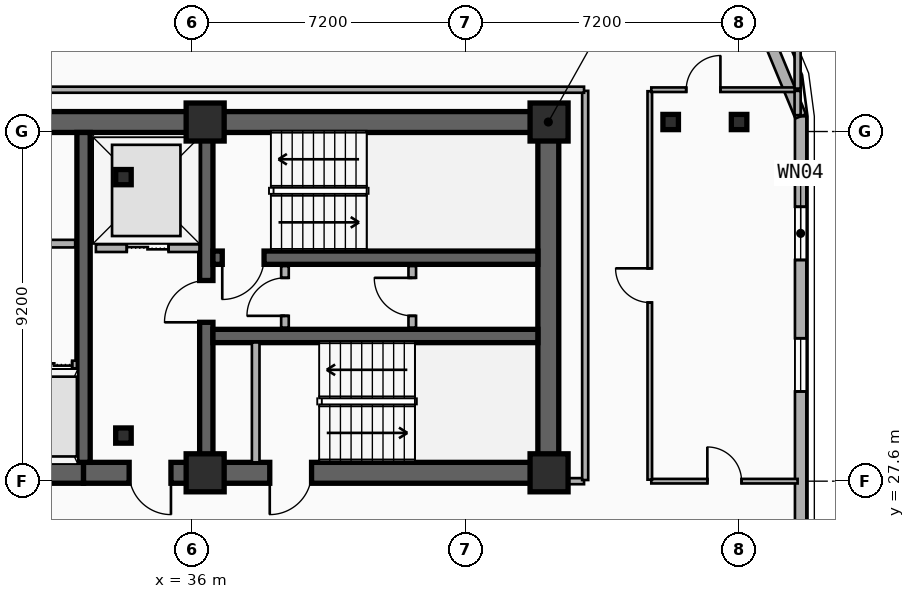
"""IFC4 building model, lengths in metres.
Left out: names, types, materials, properties, quantities, classifications, styles, units other than length and angle.
Written with IfcOpenShell. Run it as: python <this file> out.ifc"""

import sys

from ifc_helpers import new_model, si_unit, direction, frame, frame_2d, origin, origin_2d, place, context, subcontext, project, spatial, rectangle, i_section, extrude, element, fill, save


model = new_model("IFC4")
c1 = context("Model", 3, precision=1e-05, world=origin(), true_north=direction((0.0, 1.0)))
c2 = subcontext(c1, "Body", "Model", "MODEL_VIEW")
j1 = project(units=[si_unit("LENGTHUNIT", "METRE"), si_unit("PLANEANGLEUNIT", "RADIAN")], contexts=[c1])
p1 = place(None, origin())
s1 = spatial("IfcSite", under=j1, at=p1, CompositionType="ELEMENT")
p2 = place(p1, origin())
s2 = spatial("IfcBuilding", under=s1, at=p2, CompositionType="ELEMENT")
p3 = place(p2, frame((0.0, 0.0, 196.8)))
s3 = spatial("IfcBuildingStorey", under=s2, at=p3, CompositionType="ELEMENT", Elevation=196.8)
p4 = place(p3, frame((12.15, 37.05, 0.0), z_axis=(0.0, 0.0, 1.0), x_axis=(1.0, 0.0, 0.0)))
e1 = element("IfcWall", 1, at=p4, inside=s3, PredefinedType="SHEAR", context=c2, shape_type="SweptSolid", body=[
    extrude(rectangle(XDim=33.23, YDim=0.55, at=frame_2d((16.615, 0.0))), origin(), (0.0, 0.0, 1.0), 3.6),
])
p5 = place(p3, frame((33.15, 27.82, 0.0), z_axis=(0.0, 0.0, 1.0), x_axis=(-1.0, 0.0, 0.0)))
e2 = element("IfcWall", 2, at=p5, inside=s3, PredefinedType="SHEAR", context=c2, shape_type="SweptSolid", body=[
    extrude(rectangle(XDim=11.97, YDim=0.55, at=frame_2d((5.985, 0.0))), origin(), (0.0, 0.0, 1.0), 3.6),
])
p6 = place(p5, frame((6.1, 0.0, 0.0)))
e3 = element("IfcOpeningElement", 3, at=p6, cuts=e2, PredefinedType="OPENING", context=c2, shape_type="SweptSolid", body=[
    extrude(rectangle(XDim=1.6, YDim=2.2, at=frame_2d((0.8, 1.1))), frame((0.0, 0.285, 0.0), z_axis=(0.0, -1.0, 0.0), x_axis=(1.0, 0.0, 0.0)), (0.0, 0.0, 1.0), 0.57),
])
p7 = place(p3, frame((45.38, 27.82, 0.0), z_axis=(0.0, 0.0, 1.0), x_axis=(-1.0, 0.0, 0.0)))
e4 = element("IfcWall", 4, at=p7, inside=s3, PredefinedType="SHEAR", context=c2, shape_type="SweptSolid", body=[
    extrude(rectangle(XDim=12.23, YDim=0.55, at=frame_2d((6.115, 0.0))), origin(), (0.0, 0.0, 1.0), 3.6),
])
p8 = place(p7, frame((9.93, 0.0, 0.0)))
e5 = element("IfcOpeningElement", 5, at=p8, cuts=e4, PredefinedType="OPENING", context=c2, shape_type="SweptSolid", body=[
    extrude(rectangle(XDim=1.1, YDim=2.15, at=frame_2d((0.55, 1.075))), frame((0.0, 0.285, 0.0), z_axis=(0.0, -1.0, 0.0), x_axis=(1.0, 0.0, 0.0)), (0.0, 0.0, 1.0), 0.57),
])
p9 = place(p7, frame((6.23, 0.0, 0.0)))
e6 = element("IfcOpeningElement", 6, at=p9, cuts=e4, PredefinedType="OPENING", context=c2, shape_type="SweptSolid", body=[
    extrude(rectangle(XDim=1.1, YDim=2.15, at=frame_2d((0.55, 1.075))), frame((0.0, 0.285, 0.0), z_axis=(0.0, -1.0, 0.0), x_axis=(1.0, 0.0, 0.0)), (0.0, 0.0, 1.0), 0.57),
])
p10 = place(p3, frame((45.38, 28.095, 0.0), z_axis=(0.0, 0.0, 1.0), x_axis=(0.0, 1.0, 0.0)))
e7 = element("IfcWall", 7, at=p10, inside=s3, PredefinedType="SHEAR", context=c2, shape_type="SweptSolid", body=[
    extrude(rectangle(XDim=8.68, YDim=0.55, at=frame_2d((4.34, 0.0))), origin(), (0.0, 0.0, 1.0), 3.6),
])
p11 = place(p3, frame((33.15, 28.095, 0.0), z_axis=(0.0, 0.0, 1.0), x_axis=(0.0, 1.0, 0.0)))
e8 = element("IfcWall", 8, at=p11, inside=s3, PredefinedType="SHEAR", context=c2, shape_type="SweptSolid", body=[
    extrude(rectangle(XDim=8.68, YDim=0.35, at=frame_2d((4.34, 0.0))), origin(), (0.0, 0.0, 1.0), 3.6),
])
p12 = place(p3, frame((36.38, 28.095, 0.0), z_axis=(0.0, 0.0, 1.0), x_axis=(0.0, 1.0, 0.0)))
e9 = element("IfcWall", 9, at=p12, inside=s3, PredefinedType="SHEAR", context=c2, shape_type="SweptSolid", body=[
    extrude(rectangle(XDim=8.68, YDim=0.35, at=frame_2d((4.34, 0.0))), origin(), (0.0, 0.0, 1.0), 3.6),
])
p13 = place(p12, frame((3.685, 0.0, 0.0)))
e10 = element("IfcOpeningElement", 10, at=p13, cuts=e9, PredefinedType="OPENING", context=c2, shape_type="SweptSolid", body=[
    extrude(rectangle(XDim=1.1, YDim=2.15, at=frame_2d((0.55, 1.075))), frame((0.0, 0.185, 0.0), z_axis=(0.0, -1.0, 0.0), x_axis=(1.0, 0.0, 0.0)), (0.0, 0.0, 1.0), 0.37),
])
p14 = place(p3, frame((45.105, 33.48, 0.0), z_axis=(0.0, 0.0, 1.0), x_axis=(-1.0, 0.0, 0.0)))
e11 = element("IfcWall", 11, at=p14, inside=s3, PredefinedType="SHEAR", context=c2, shape_type="SweptSolid", body=[
    extrude(rectangle(XDim=8.55, YDim=0.35, at=frame_2d((4.275, 0.0))), origin(), (0.0, 0.0, 1.0), 3.6),
])
p15 = place(p14, frame((7.205, 0.0, 0.0)))
e12 = element("IfcOpeningElement", 12, at=p15, cuts=e11, PredefinedType="OPENING", context=c2, shape_type="SweptSolid", body=[
    extrude(rectangle(XDim=1.1, YDim=2.15, at=frame_2d((0.55, 1.075))), frame((0.0, 0.185, 0.0), z_axis=(0.0, -1.0, 0.0), x_axis=(1.0, 0.0, 0.0)), (0.0, 0.0, 1.0), 0.37),
])
p16 = place(p3, frame((36.555, 31.42, 0.0), z_axis=(0.0, 0.0, 1.0), x_axis=(1.0, 0.0, 0.0)))
e13 = element("IfcWall", 13, at=p16, inside=s3, PredefinedType="SHEAR", context=c2, shape_type="SweptSolid", body=[
    extrude(rectangle(XDim=8.55, YDim=0.35, at=frame_2d((4.275, 0.0))), origin(), (0.0, 0.0, 1.0), 3.6),
])
for number, where, z_axis, x_axis in (
    (14, (34.2, 28.8, 0.0), (0.0, 0.0, 1.0), (1.0, 0.0, 0.0)),
    (15, (34.2, 35.6, 0.0), (0.0, 0.0, 1.0), (1.0, 0.0, 0.0)),
):
    element("IfcColumn", number, at=place(p3, frame(where, z_axis=z_axis, x_axis=x_axis)), inside=s3, PredefinedType="COLUMN", context=c2, shape_type="SweptSolid", body=[
        extrude(i_section(OverallWidth=0.408, OverallDepth=0.4, WebThickness=0.025, FlangeThickness=0.039, FilletRadius=0.015, at=origin_2d()), origin(), (0.0, 0.0, 1.0), 3.6),
    ])
for number, where, z_axis, x_axis in (
    (16, (36.35, 27.82, 0.0), (0.0, 0.0, 1.0), (1.0, 0.0, 0.0)),
    (17, (36.35, 37.05, 0.0), (0.0, 0.0, 1.0), (1.0, 0.0, 0.0)),
    (18, (45.4, 27.82, 0.0), (0.0, 0.0, 1.0), (1.0, 0.0, 0.0)),
    (19, (45.4, 37.05, 0.0), (0.0, 0.0, 1.0), (1.0, 0.0, 0.0)),
):
    element("IfcColumn", number, at=place(p3, frame(where, z_axis=z_axis, x_axis=x_axis)), inside=s3, PredefinedType="COLUMN", context=c2, shape_type="SweptSolid", body=[
        extrude(rectangle(XDim=1.0, YDim=1.0, at=origin_2d()), origin(), (0.0, 0.0, 1.0), 3.6),
    ])
for number, where, z_axis, x_axis in (
    (20, (48.6, 37.05, 0.0), (0.0, 0.0, 1.0), (1.0, 0.0, 0.0)),
    (21, (50.4, 37.05, 0.0), (0.0, 0.0, 1.0), (1.0, 0.0, 0.0)),
):
    element("IfcColumn", number, at=place(p3, frame(where, z_axis=z_axis, x_axis=x_axis)), inside=s3, PredefinedType="COLUMN", context=c2, shape_type="SweptSolid", body=[
        extrude(i_section(OverallWidth=0.408, OverallDepth=0.4, WebThickness=0.025, FlangeThickness=0.039, FilletRadius=0.015, at=origin_2d()), origin(), (0.0, 0.0, 1.0), 3.6),
    ])
p17 = place(p3, frame((52.02, 37.2, 0.0), z_axis=(0.0, 0.0, 1.0), x_axis=(0.0, -1.0, 0.0)))
e22 = element("IfcWall", 22, at=p17, inside=s3, PredefinedType="SOLIDWALL", context=c2, shape_type="SweptSolid", body=[
    extrude(rectangle(XDim=28.6, YDim=0.3, at=frame_2d((14.3, 0.0))), origin(), (0.0, 0.0, 1.0), 3.34),
])
p18 = place(p17, frame((2.38, 0.0, 0.34)))
e23 = element("IfcOpeningElement", 23, at=p18, cuts=e22, PredefinedType="OPENING", context=c2, shape_type="SweptSolid", body=[
    extrude(rectangle(XDim=1.4, YDim=2.1, at=frame_2d((0.7, 1.05))), frame((0.0, 0.16, 0.0), z_axis=(0.0, -1.0, 0.0), x_axis=(1.0, 0.0, 0.0)), (0.0, 0.0, 1.0), 0.32),
])
p19 = place(p17, frame((5.84, 0.0, 0.34)))
e24 = element("IfcOpeningElement", 24, at=p19, cuts=e22, PredefinedType="OPENING", context=c2, shape_type="SweptSolid", body=[
    extrude(rectangle(XDim=1.4, YDim=2.1, at=frame_2d((0.7, 1.05))), frame((0.0, 0.16, 0.0), z_axis=(0.0, -1.0, 0.0), x_axis=(1.0, 0.0, 0.0)), (0.0, 0.0, 1.0), 0.32),
])
p20 = place(p17, frame((16.527, 0.0, 0.34)))
e25 = element("IfcOpeningElement", 25, at=p20, cuts=e22, PredefinedType="OPENING", context=c2, shape_type="SweptSolid", body=[
    extrude(rectangle(XDim=1.4, YDim=2.1, at=frame_2d((0.7, 1.05))), frame((0.0, 0.16, 0.0), z_axis=(0.0, -1.0, 0.0), x_axis=(1.0, 0.0, 0.0)), (0.0, 0.0, 1.0), 0.32),
])
p21 = place(p17, frame((22.403, 0.0, 0.34)))
e26 = element("IfcOpeningElement", 26, at=p21, cuts=e22, PredefinedType="OPENING", context=c2, shape_type="SweptSolid", body=[
    extrude(rectangle(XDim=1.4, YDim=2.1, at=frame_2d((0.7, 1.05))), frame((0.0, 0.16, 0.0), z_axis=(0.0, -1.0, 0.0), x_axis=(1.0, 0.0, 0.0)), (0.0, 0.0, 1.0), 0.32),
])
p22 = place(p3, frame((50.843, 40.042, 0.0), z_axis=(0.0, 0.0, 1.0), x_axis=(0.382704529509, -0.923870793506, 0.0)))
e27 = element("IfcWall", 27, at=p22, inside=s3, PredefinedType="SOLIDWALL", context=c2, shape_type="SweptSolid", body=[
    extrude(rectangle(XDim=3.077, YDim=0.3, at=frame_2d((1.538, 0.0))), origin(), (0.0, 0.0, 1.0), 3.34),
])
p23 = place(p3, frame((33.475, 33.73, 0.0), z_axis=(0.0, 0.0, 1.0), x_axis=(1.0, 0.0, 0.0)))
e28 = element("IfcWall", 28, at=p23, inside=s3, PredefinedType="PARTITIONING", context=c2, shape_type="SweptSolid", body=[
    extrude(rectangle(XDim=2.725, YDim=0.2, at=frame_2d((1.362, 0.0))), origin(), (0.0, 0.0, 1.0), 2.41),
])
p24 = place(p23, frame((0.812, 0.0, 0.0)))
e29 = element("IfcOpeningElement", 29, at=p24, cuts=e28, PredefinedType="OPENING", context=c2, shape_type="SweptSolid", body=[
    extrude(rectangle(XDim=1.1, YDim=2.15, at=frame_2d((0.55, 1.075))), frame((0.0, 0.11, 0.0), z_axis=(0.0, -1.0, 0.0), x_axis=(1.0, 0.0, 0.0)), (0.0, 0.0, 1.0), 0.22),
])
p25 = place(p3, frame((31.775, 30.67, 0.0), z_axis=(0.0, 0.0, 1.0), x_axis=(1.0, 0.0, 0.0)))
e30 = element("IfcWall", 30, at=p25, inside=s3, PredefinedType="PARTITIONING", context=c2, shape_type="SweptSolid", body=[
    extrude(rectangle(XDim=1.2, YDim=0.2, at=frame_2d((0.6, 0.0))), origin(), (0.0, 0.0, 1.0), 2.72),
])
p26 = place(p25, frame((0.125, 0.0, 0.0)))
e31 = element("IfcOpeningElement", 31, at=p26, cuts=e30, PredefinedType="OPENING", context=c2, shape_type="SweptSolid", body=[
    extrude(rectangle(XDim=0.95, YDim=2.15, at=frame_2d((0.475, 1.075))), frame((0.0, 0.11, 0.0), z_axis=(0.0, -1.0, 0.0), x_axis=(1.0, 0.0, 0.0)), (0.0, 0.0, 1.0), 0.22),
])
p27 = place(p3, frame((37.68, 28.095, 0.0), z_axis=(0.0, 0.0, 1.0), x_axis=(0.0, 1.0, 0.0)))
e32 = element("IfcWall", 32, at=p27, inside=s3, PredefinedType="PARTITIONING", context=c2, shape_type="SweptSolid", body=[
    extrude(rectangle(XDim=3.155, YDim=0.2, at=frame_2d((1.578, 0.0))), origin(), (0.0, 0.0, 1.0), 2.72),
])
p28 = place(p3, frame((38.45, 31.64, 0.0), z_axis=(0.0, 0.0, 1.0), x_axis=(0.0, 1.0, 0.0)))
e33 = element("IfcWall", 33, at=p28, inside=s3, PredefinedType="PARTITIONING", context=c2, shape_type="SweptSolid", body=[
    extrude(rectangle(XDim=1.62, YDim=0.2, at=frame_2d((0.81, 0.0))), origin(), (0.0, 0.0, 1.0), 3.34),
])
p29 = place(p28, frame((0.31, 0.0, 0.0)))
e34 = element("IfcOpeningElement", 34, at=p29, cuts=e33, PredefinedType="OPENING", context=c2, shape_type="SweptSolid", body=[
    extrude(rectangle(XDim=1.0, YDim=2.15, at=frame_2d((0.5, 1.075))), frame((0.0, 0.11, 0.0), z_axis=(0.0, -1.0, 0.0), x_axis=(1.0, 0.0, 0.0)), (0.0, 0.0, 1.0), 0.22),
])
p30 = place(p3, frame((41.8, 31.64, 0.0), z_axis=(0.0, 0.0, 1.0), x_axis=(0.0, 1.0, 0.0)))
e35 = element("IfcWall", 35, at=p30, inside=s3, PredefinedType="PARTITIONING", context=c2, shape_type="SweptSolid", body=[
    extrude(rectangle(XDim=1.62, YDim=0.2, at=frame_2d((0.81, 0.0))), origin(), (0.0, 0.0, 1.0), 3.34),
])
p31 = place(p30, frame((0.31, 0.0, 0.0)))
e36 = element("IfcOpeningElement", 36, at=p31, cuts=e35, PredefinedType="OPENING", context=c2, shape_type="SweptSolid", body=[
    extrude(rectangle(XDim=1.0, YDim=2.15, at=frame_2d((0.5, 1.075))), frame((0.0, 0.11, 0.0), z_axis=(0.0, -1.0, 0.0), x_axis=(1.0, 0.0, 0.0)), (0.0, 0.0, 1.0), 0.22),
])
p32 = place(p3, frame((27.24, 33.85, 0.0), z_axis=(0.0, 0.0, 1.0), x_axis=(1.0, 0.0, 0.0)))
e37 = element("IfcWall", 37, at=p32, inside=s3, PredefinedType="PARTITIONING", context=c2, shape_type="SweptSolid", body=[
    extrude(rectangle(XDim=5.69, YDim=0.2, at=frame_2d((2.845, 0.0))), origin(), (0.0, 0.0, 1.0), 2.41),
])
p33 = place(p32, frame((2.245, 0.0, 0.0)))
e38 = element("IfcOpeningElement", 38, at=p33, cuts=e37, PredefinedType="OPENING", context=c2, shape_type="SweptSolid", body=[
    extrude(rectangle(XDim=1.2, YDim=2.15, at=frame_2d((0.6, 1.075))), frame((0.0, 0.11, 0.0), z_axis=(0.0, -1.0, 0.0), x_axis=(1.0, 0.0, 0.0)), (0.0, 0.0, 1.0), 0.22),
])
p34 = place(p3, frame((48.09, 27.6, 0.0), z_axis=(0.0, 0.0, 1.0), x_axis=(1.0, 0.0, 0.0)))
e39 = element("IfcWall", 39, at=p34, inside=s3, PredefinedType="PARTITIONING", context=c2, shape_type="SweptSolid", body=[
    extrude(rectangle(XDim=3.85, YDim=0.12, at=frame_2d((1.925, 0.0))), origin(), (0.0, 0.0, 1.0), 2.67),
])
p35 = place(p34, frame((1.475, 0.0, 0.0)))
e40 = element("IfcOpeningElement", 40, at=p35, cuts=e39, PredefinedType="OPENING", context=c2, shape_type="SweptSolid", body=[
    extrude(rectangle(XDim=0.9, YDim=2.1, at=frame_2d((0.45, 1.05))), frame((0.0, 0.07, 0.0), z_axis=(0.0, -1.0, 0.0), x_axis=(1.0, 0.0, 0.0)), (0.0, 0.0, 1.0), 0.14),
])
p36 = place(p3, frame((48.05, 27.64, 0.0), z_axis=(0.0, 0.0, 1.0), x_axis=(0.0, 1.0, 0.0)))
e41 = element("IfcWall", 41, at=p36, inside=s3, PredefinedType="PARTITIONING", context=c2, shape_type="SweptSolid", body=[
    extrude(rectangle(XDim=10.22, YDim=0.12, at=frame_2d((5.11, 0.0))), origin(), (0.0, 0.0, 1.0), 2.82),
])
p37 = place(p36, frame((4.66, 0.0, 0.0)))
e42 = element("IfcOpeningElement", 42, at=p37, cuts=e41, PredefinedType="OPENING", context=c2, shape_type="SweptSolid", body=[
    extrude(rectangle(XDim=0.9, YDim=2.1, at=frame_2d((0.45, 1.05))), frame((0.0, 0.07, 0.0), z_axis=(0.0, -1.0, 0.0), x_axis=(1.0, 0.0, 0.0)), (0.0, 0.0, 1.0), 0.14),
])
p38 = place(p3, frame((48.09, 37.9, 0.0), z_axis=(0.0, 0.0, 1.0), x_axis=(1.0, 0.0, 0.0)))
e43 = element("IfcWall", 43, at=p38, inside=s3, PredefinedType="PARTITIONING", context=c2, shape_type="SweptSolid", body=[
    extrude(rectangle(XDim=3.85, YDim=0.12, at=frame_2d((1.925, 0.0))), origin(), (0.0, 0.0, 1.0), 3.34),
])
p39 = place(p38, frame((0.919, 0.0, 0.0)))
e44 = element("IfcOpeningElement", 44, at=p39, cuts=e43, PredefinedType="OPENING", context=c2, shape_type="SweptSolid", body=[
    extrude(rectangle(XDim=0.9, YDim=2.1, at=frame_2d((0.45, 1.05))), frame((0.0, 0.07, 0.0), z_axis=(0.0, -1.0, 0.0), x_axis=(1.0, 0.0, 0.0)), (0.0, 0.0, 1.0), 0.14),
])
p40 = place(p3, frame((45.41, 27.6, 0.0), z_axis=(0.0, 0.0, 1.0), x_axis=(1.0, 0.0, 0.0)))
e45 = element("IfcWall", 45, at=p40, inside=s3, PredefinedType="PARTITIONING", context=c2, shape_type="SweptSolid", body=[
    extrude(rectangle(XDim=0.91, YDim=0.16, at=frame_2d((0.455, 0.0))), origin(), (0.0, 0.0, 1.0), 2.41),
])
p41 = place(p3, frame((46.35, 27.63, 0.0), z_axis=(0.0, 0.0, 1.0), x_axis=(0.0, 1.0, 0.0)))
e46 = element("IfcWall", 46, at=p41, inside=s3, PredefinedType="PARTITIONING", context=c2, shape_type="SweptSolid", body=[
    extrude(rectangle(XDim=10.24, YDim=0.16, at=frame_2d((5.12, 0.0))), origin(), (0.0, 0.0, 1.0), 2.82),
])
p42 = place(p3, frame((11.28, 37.9, 0.0), z_axis=(0.0, 0.0, 1.0), x_axis=(1.0, 0.0, 0.0)))
e47 = element("IfcWall", 47, at=p42, inside=s3, PredefinedType="PARTITIONING", context=c2, shape_type="SweptSolid", body=[
    extrude(rectangle(XDim=35.04, YDim=0.16, at=frame_2d((17.52, 0.0))), origin(), (0.0, 0.0, 1.0), 3.34),
])
p43 = place(p3, frame((51.94, 37.93, 0.0), z_axis=(0.0, 0.0, 1.0), x_axis=(0.0, 1.0, 0.0)))
e48 = element("IfcWall", 48, at=p43, inside=s3, PredefinedType="PARTITIONING", context=c2, shape_type="SweptSolid", body=[
    extrude(rectangle(XDim=1.44, YDim=0.16, at=frame_2d((0.72, 0.0))), origin(), (0.0, 0.0, 1.0), 3.34),
])
p44 = place(p3, frame((51.94, 37.23, 0.0), z_axis=(0.0, 0.0, 1.0), x_axis=(0.0, 1.0, 0.0)))
e49 = element("IfcWall", 49, at=p44, inside=s3, PredefinedType="PARTITIONING", context=c2, shape_type="SweptSolid", body=[
    extrude(rectangle(XDim=0.64, YDim=0.16, at=frame_2d((0.32, 0.0))), origin(), (0.0, 0.0, 1.0), 3.34),
])
p45 = place(p18, origin())
e50 = element("IfcWindow", 50, at=p45, inside=s3, PartitioningType="SINGLE_PANEL", PredefinedType="WINDOW", context=c2, shape_type="SweptSolid", body=[
    extrude(rectangle(XDim=1.4, YDim=2.1, at=frame_2d((0.7, 1.05))), frame((0.0, 0.03, 0.0), z_axis=(0.0, -1.0, 0.0), x_axis=(1.0, 0.0, 0.0)), (0.0, 0.0, 1.0), 0.06),
])
fill(e23, e50)
p46 = place(p19, origin())
e51 = element("IfcWindow", 51, at=p46, inside=s3, PartitioningType="SINGLE_PANEL", PredefinedType="WINDOW", context=c2, shape_type="SweptSolid", body=[
    extrude(rectangle(XDim=1.4, YDim=2.1, at=frame_2d((0.7, 1.05))), frame((0.0, 0.03, 0.0), z_axis=(0.0, -1.0, 0.0), x_axis=(1.0, 0.0, 0.0)), (0.0, 0.0, 1.0), 0.06),
])
fill(e24, e51)
p47 = place(p24, origin())
e52 = element("IfcDoor", 52, at=p47, inside=s3, OperationType="DOUBLE_DOOR_SLIDING", PredefinedType="DOOR", context=c2, shape_type="SweptSolid", body=[
    extrude(rectangle(XDim=1.1, YDim=2.15, at=frame_2d((0.55, 1.075))), frame((0.0, 0.025, 0.0), z_axis=(0.0, -1.0, 0.0), x_axis=(1.0, 0.0, 0.0)), (0.0, 0.0, 1.0), 0.05),
])
fill(e29, e52)
p48 = place(p26, origin())
e53 = element("IfcDoor", 53, at=p48, inside=s3, OperationType="DOUBLE_DOOR_SLIDING", PredefinedType="DOOR", context=c2, shape_type="SweptSolid", body=[
    extrude(rectangle(XDim=0.95, YDim=2.15, at=frame_2d((0.475, 1.075))), frame((0.0, 0.025, 0.0), z_axis=(0.0, -1.0, 0.0), x_axis=(1.0, 0.0, 0.0)), (0.0, 0.0, 1.0), 0.05),
])
fill(e31, e53)
p49 = place(p15, origin())
e54 = element("IfcDoor", 54, at=p49, inside=s3, OperationType="SINGLE_SWING_RIGHT", PredefinedType="DOOR", context=c2, shape_type="SweptSolid", body=[
    extrude(rectangle(XDim=1.1, YDim=2.15, at=frame_2d((0.55, 1.075))), frame((0.0, 0.025, 0.0), z_axis=(0.0, -1.0, 0.0), x_axis=(1.0, 0.0, 0.0)), (0.0, 0.0, 1.0), 0.05),
])
fill(e12, e54)
p50 = place(p13, origin())
e55 = element("IfcDoor", 55, at=p50, inside=s3, OperationType="SINGLE_SWING_LEFT", PredefinedType="DOOR", context=c2, shape_type="SweptSolid", body=[
    extrude(rectangle(XDim=1.1, YDim=2.15, at=frame_2d((0.55, 1.075))), frame((0.0, 0.025, 0.0), z_axis=(0.0, -1.0, 0.0), x_axis=(1.0, 0.0, 0.0)), (0.0, 0.0, 1.0), 0.05),
])
fill(e10, e55)
p51 = place(p8, origin())
e56 = element("IfcDoor", 56, at=p51, inside=s3, OperationType="SINGLE_SWING_LEFT", PredefinedType="DOOR", context=c2, shape_type="SweptSolid", body=[
    extrude(rectangle(XDim=1.1, YDim=2.15, at=frame_2d((0.55, 1.075))), frame((0.0, 0.025, 0.0), z_axis=(0.0, -1.0, 0.0), x_axis=(1.0, 0.0, 0.0)), (0.0, 0.0, 1.0), 0.05),
])
fill(e5, e56)
p52 = place(p9, origin())
e57 = element("IfcDoor", 57, at=p52, inside=s3, OperationType="SINGLE_SWING_RIGHT", PredefinedType="DOOR", context=c2, shape_type="SweptSolid", body=[
    extrude(rectangle(XDim=1.1, YDim=2.15, at=frame_2d((0.55, 1.075))), frame((0.0, 0.025, 0.0), z_axis=(0.0, -1.0, 0.0), x_axis=(1.0, 0.0, 0.0)), (0.0, 0.0, 1.0), 0.05),
])
fill(e6, e57)
p53 = place(p29, origin())
e58 = element("IfcDoor", 58, at=p53, inside=s3, OperationType="SINGLE_SWING_LEFT", PredefinedType="DOOR", context=c2, shape_type="SweptSolid", body=[
    extrude(rectangle(XDim=1.0, YDim=2.15, at=frame_2d((0.5, 1.075))), frame((0.0, 0.025, 0.0), z_axis=(0.0, -1.0, 0.0), x_axis=(1.0, 0.0, 0.0)), (0.0, 0.0, 1.0), 0.05),
])
fill(e34, e58)
p54 = place(p31, origin())
e59 = element("IfcDoor", 59, at=p54, inside=s3, OperationType="SINGLE_SWING_RIGHT", PredefinedType="DOOR", context=c2, shape_type="SweptSolid", body=[
    extrude(rectangle(XDim=1.0, YDim=2.15, at=frame_2d((0.5, 1.075))), frame((0.0, 0.025, 0.0), z_axis=(0.0, -1.0, 0.0), x_axis=(1.0, 0.0, 0.0)), (0.0, 0.0, 1.0), 0.05),
])
fill(e36, e59)
p55 = place(p35, origin())
e60 = element("IfcDoor", 60, at=p55, inside=s3, OperationType="SINGLE_SWING_LEFT", PredefinedType="DOOR", context=c2, shape_type="SweptSolid", body=[
    extrude(rectangle(XDim=0.9, YDim=2.1, at=frame_2d((0.45, 1.05))), frame((0.0, 0.025, 0.0), z_axis=(0.0, -1.0, 0.0), x_axis=(1.0, 0.0, 0.0)), (0.0, 0.0, 1.0), 0.05),
])
fill(e40, e60)
p56 = place(p37, origin())
e61 = element("IfcDoor", 61, at=p56, inside=s3, OperationType="SINGLE_SWING_RIGHT", PredefinedType="DOOR", context=c2, shape_type="SweptSolid", body=[
    extrude(rectangle(XDim=0.9, YDim=2.1, at=frame_2d((0.45, 1.05))), frame((0.0, 0.025, 0.0), z_axis=(0.0, -1.0, 0.0), x_axis=(1.0, 0.0, 0.0)), (0.0, 0.0, 1.0), 0.05),
])
fill(e42, e61)
p57 = place(p39, origin())
e62 = element("IfcDoor", 62, at=p57, inside=s3, OperationType="SINGLE_SWING_RIGHT", PredefinedType="DOOR", context=c2, shape_type="SweptSolid", body=[
    extrude(rectangle(XDim=0.9, YDim=2.1, at=frame_2d((0.45, 1.05))), frame((0.0, 0.025, 0.0), z_axis=(0.0, -1.0, 0.0), x_axis=(1.0, 0.0, 0.0)), (0.0, 0.0, 1.0), 0.05),
])
fill(e44, e62)
save(model, sys.argv[1])
